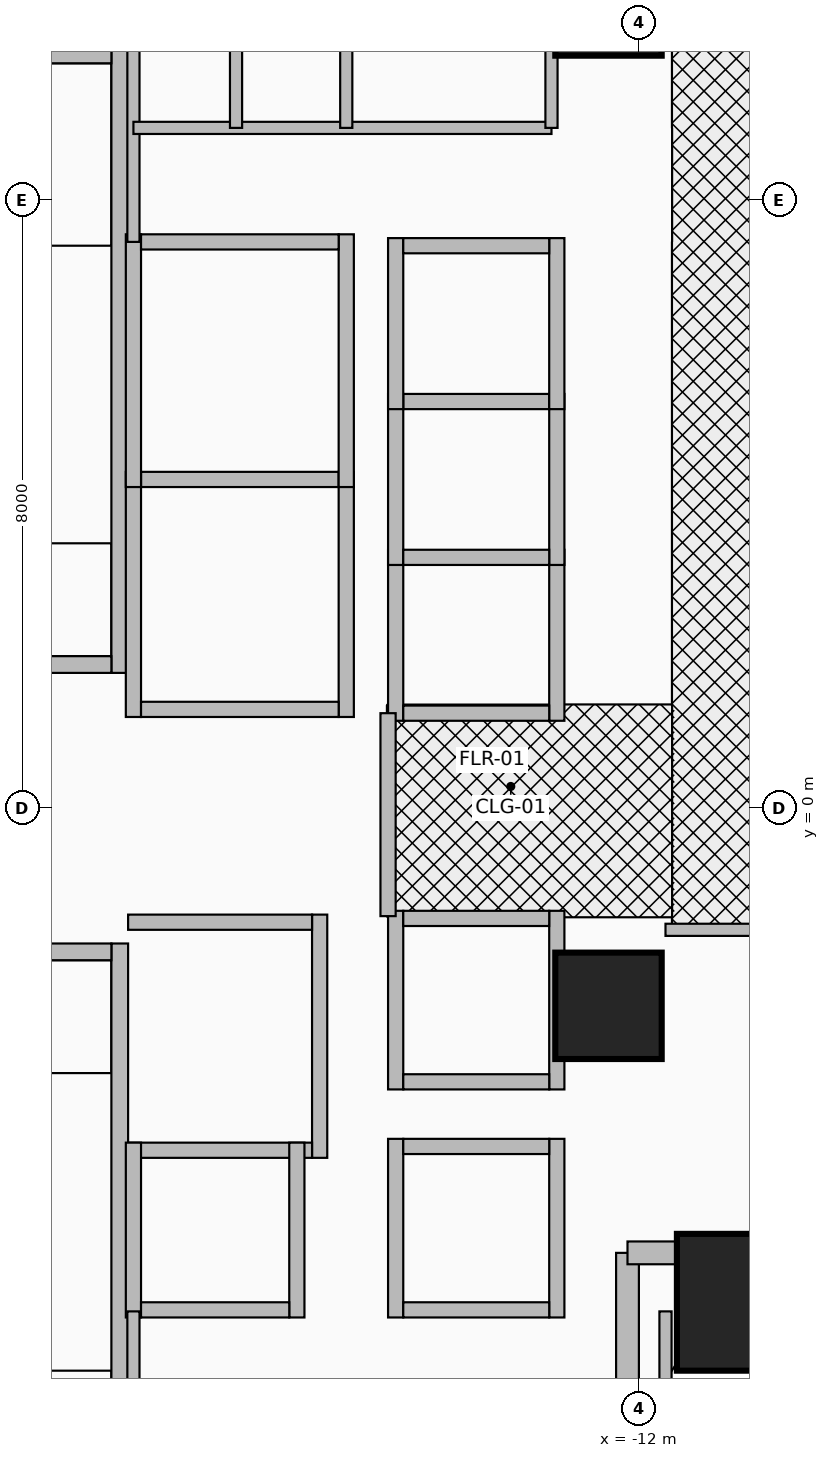
"""IFC4 building model, lengths in metres.
Left out: names, types, materials, properties, quantities, classifications, styles, units other than length and angle.
Written with IfcOpenShell. Run it as: python <this file> out.ifc"""

import sys

from ifc_helpers import new_model, si_unit, direction, frame, frame_2d, origin, origin_2d, place, context, subcontext, project, spatial, rectangle, extrude, source, transform, mapped, element, fill, save


model = new_model("IFC4")
c1 = context("Model", 3, precision=1e-05, world=origin(), true_north=direction((0.0, 1.0)))
c2 = subcontext(c1, "Body", "Model", "MODEL_VIEW")
j1 = project(units=[si_unit("LENGTHUNIT", "METRE"), si_unit("PLANEANGLEUNIT", "RADIAN")], contexts=[c1])
p1 = place(None, origin())
s1 = spatial("IfcSite", under=j1, at=p1, CompositionType="ELEMENT")
p2 = place(p1, origin())
s2 = spatial("IfcBuilding", under=s1, at=p2, CompositionType="ELEMENT")
p3 = place(p2, frame((0.0, 0.0, 10.4)))
s3 = spatial("IfcBuildingStorey", under=s2, at=p3, CompositionType="ELEMENT", Elevation=10.4)
p4 = place(p3, frame((-18.83, 1.78, 0.0), z_axis=(0.0, 0.0, 1.0), x_axis=(0.0, 1.0, 0.0)))
e1 = element("IfcWall", 1, at=p4, inside=s3, PredefinedType="SHEAR", context=c2, shape_type="SweptSolid", body=[
    extrude(rectangle(XDim=8.67, YDim=0.22, at=frame_2d((4.335, 0.0))), origin(), (0.0, 0.0, 1.0), 4.92),
])
p5 = place(p3, frame((-22.05, 1.89, 0.0), z_axis=(0.0, 0.0, 1.0), x_axis=(1.0, 0.0, 0.0)))
e2 = element("IfcWall", 2, at=p5, inside=s3, PredefinedType="SHEAR", context=c2, shape_type="SweptSolid", body=[
    extrude(rectangle(XDim=3.11, YDim=0.22, at=frame_2d((1.555, 0.0))), origin(), (0.0, 0.0, 1.0), 4.92),
])
p6 = place(p5, frame((1.0, 0.0, 0.0)))
e3 = element("IfcOpeningElement", 3, at=p6, cuts=e2, PredefinedType="OPENING", context=c2, shape_type="SweptSolid", body=[
    extrude(rectangle(XDim=1.1, YDim=2.15, at=frame_2d((0.55, 1.075))), frame((0.0, 0.125, 0.0), z_axis=(0.0, -1.0, 0.0), x_axis=(1.0, 0.0, 0.0)), (0.0, 0.0, 1.0), 0.25),
])
p7 = place(p3, frame((-22.05, 9.91, 0.0), z_axis=(0.0, 0.0, 1.0), x_axis=(1.0, 0.0, 0.0)))
e4 = element("IfcWall", 4, at=p7, inside=s3, PredefinedType="SHEAR", context=c2, shape_type="SweptSolid", body=[
    extrude(rectangle(XDim=3.11, YDim=0.22, at=frame_2d((1.555, 0.0))), origin(), (0.0, 0.0, 1.0), 4.92),
])
p8 = place(p3, frame((-18.83, -10.45, 0.0), z_axis=(0.0, 0.0, 1.0), x_axis=(0.0, 1.0, 0.0)))
e5 = element("IfcWall", 5, at=p8, inside=s3, PredefinedType="SHEAR", context=c2, shape_type="SweptSolid", body=[
    extrude(rectangle(XDim=8.67, YDim=0.22, at=frame_2d((4.335, 0.0))), origin(), (0.0, 0.0, 1.0), 4.92),
])
p9 = place(p3, frame((-22.05, -1.89, 0.0), z_axis=(0.0, 0.0, 1.0), x_axis=(1.0, 0.0, 0.0)))
e6 = element("IfcWall", 6, at=p9, inside=s3, PredefinedType="SHEAR", context=c2, shape_type="SweptSolid", body=[
    extrude(rectangle(XDim=3.11, YDim=0.22, at=frame_2d((1.555, 0.0))), origin(), (0.0, 0.0, 1.0), 4.92),
])
p10 = place(p9, frame((1.0, 0.0, 0.0)))
e7 = element("IfcOpeningElement", 7, at=p10, cuts=e6, PredefinedType="OPENING", context=c2, shape_type="SweptSolid", body=[
    extrude(rectangle(XDim=1.1, YDim=2.15, at=frame_2d((0.55, 1.075))), frame((0.0, 0.125, 0.0), z_axis=(0.0, -1.0, 0.0), x_axis=(1.0, 0.0, 0.0)), (0.0, 0.0, 1.0), 0.25),
])
m1 = source(origin(), c2, "Body", "SweptSolid", [
    extrude(rectangle(XDim=1.4, YDim=1.4, at=origin_2d()), origin(), (0.0, 0.0, 1.0), 5.2),
])
for number, where, z_axis, x_axis in (
    (8, (-12.4, -2.6, 0.0), (0.0, 0.0, 1.0), (1.0, 0.0, 0.0)),
    (9, (-12.4, 10.6, 0.0), (0.0, 0.0, 1.0), (1.0, 0.0, 0.0)),
):
    element("IfcColumn", number, at=place(p3, frame(where, z_axis=z_axis, x_axis=x_axis)), inside=s3, PredefinedType="COLUMN", context=c2, shape_type="MappedRepresentation", body=[
        mapped(m1, transform((0.0, 0.0, 0.0), x_axis=(1.0, 0.0, 0.0), y_axis=(0.0, 1.0, 0.0), z_axis=(0.0, 0.0, 1.0), scale=1.0)),
    ])
m2 = source(origin(), c2, "Body", "SweptSolid", [
    extrude(rectangle(XDim=1.8, YDim=1.8, at=origin_2d()), origin(), (0.0, 0.0, 1.0), 5.2),
])
p11 = place(p3, frame((-10.6, -6.5, 0.0), z_axis=(0.0, 0.0, 1.0), x_axis=(1.0, 0.0, 0.0)))
e10 = element("IfcColumn", 10, at=p11, inside=s3, PredefinedType="COLUMN", context=c2, shape_type="MappedRepresentation", body=[
    mapped(m2, transform((0.0, 0.0, 0.0), x_axis=(1.0, 0.0, 0.0), y_axis=(0.0, 1.0, 0.0), z_axis=(0.0, 0.0, 1.0), scale=1.0)),
])
p12 = place(p3, frame((-12.15, -22.85, 0.0), z_axis=(0.0, 0.0, 1.0), x_axis=(0.0, 1.0, 0.0)))
e11 = element("IfcWall", 11, at=p12, inside=s3, PredefinedType="SOLIDWALL", context=c2, shape_type="SweptSolid", body=[
    extrude(rectangle(XDim=17.0, YDim=0.3, at=frame_2d((8.5, 0.0))), origin(), (0.0, 0.0, 1.0), 3.957),
])
p13 = place(p3, frame((-12.15, -5.85, 0.0), z_axis=(0.0, 0.0, 1.0), x_axis=(1.0, 0.0, 0.0)))
e12 = element("IfcWall", 12, at=p13, inside=s3, PredefinedType="SOLIDWALL", context=c2, shape_type="SweptSolid", body=[
    extrude(rectangle(XDim=2.63, YDim=0.3, at=frame_2d((1.315, 0.0))), origin(), (0.0, 0.0, 1.0), 4.92),
])
for number, where, z_axis, x_axis in (
    (13, (-18.65, 1.2, 0.0), (0.0, 0.0, 1.0), (0.0, 1.0, 0.0)),
    (14, (-15.85, 1.2, 0.0), (0.0, 0.0, 1.0), (0.0, 1.0, 0.0)),
):
    element("IfcWall", number, at=place(p3, frame(where, z_axis=z_axis, x_axis=x_axis)), inside=s3, PredefinedType="MOVABLE", context=c2, shape_type="SweptSolid", body=[
        extrude(rectangle(XDim=3.225, YDim=0.2, at=frame_2d((1.613, 0.0))), origin(), (0.0, 0.0, 1.0), 4.92),
    ])
p14 = place(p3, frame((-18.55, 1.3, 0.0), z_axis=(0.0, 0.0, 1.0), x_axis=(1.0, 0.0, 0.0)))
e15 = element("IfcWall", 15, at=p14, inside=s3, PredefinedType="MOVABLE", context=c2, shape_type="SweptSolid", body=[
    extrude(rectangle(XDim=2.6, YDim=0.2, at=frame_2d((1.3, 0.0))), origin(), (0.0, 0.0, 1.0), 4.92),
])
p15 = place(p14, frame((0.7, 0.0, 0.0)))
e16 = element("IfcOpeningElement", 16, at=p15, cuts=e15, PredefinedType="OPENING", context=c2, shape_type="SweptSolid", body=[
    extrude(rectangle(XDim=1.2, YDim=2.1, at=frame_2d((0.6, 1.05))), frame((0.0, 0.115, 0.0), z_axis=(0.0, -1.0, 0.0), x_axis=(1.0, 0.0, 0.0)), (0.0, 0.0, 1.0), 0.23),
])
p16 = place(p3, frame((-18.55, 4.325, 0.0), z_axis=(0.0, 0.0, 1.0), x_axis=(1.0, 0.0, 0.0)))
e17 = element("IfcWall", 17, at=p16, inside=s3, PredefinedType="MOVABLE", context=c2, shape_type="SweptSolid", body=[
    extrude(rectangle(XDim=2.6, YDim=0.2, at=frame_2d((1.3, 0.0))), origin(), (0.0, 0.0, 1.0), 4.92),
])
p17 = place(p3, frame((-16.2, -4.6, 0.0), z_axis=(0.0, 0.0, 1.0), x_axis=(0.0, 1.0, 0.0)))
e18 = element("IfcWall", 18, at=p17, inside=s3, PredefinedType="MOVABLE", context=c2, shape_type="SweptSolid", body=[
    extrude(rectangle(XDim=3.2, YDim=0.2, at=frame_2d((1.6, 0.0))), origin(), (0.0, 0.0, 1.0), 4.92),
])
p18 = place(p3, frame((-18.72, -4.5, 0.0), z_axis=(0.0, 0.0, 1.0), x_axis=(1.0, 0.0, 0.0)))
e19 = element("IfcWall", 19, at=p18, inside=s3, PredefinedType="MOVABLE", context=c2, shape_type="SweptSolid", body=[
    extrude(rectangle(XDim=2.42, YDim=0.2, at=frame_2d((1.21, 0.0))), origin(), (0.0, 0.0, 1.0), 4.92),
])
p19 = place(p3, frame((-18.72, -1.5, 0.0), z_axis=(0.0, 0.0, 1.0), x_axis=(1.0, 0.0, 0.0)))
e20 = element("IfcWall", 20, at=p19, inside=s3, PredefinedType="MOVABLE", context=c2, shape_type="SweptSolid", body=[
    extrude(rectangle(XDim=2.42, YDim=0.2, at=frame_2d((1.21, 0.0))), origin(), (0.0, 0.0, 1.0), 4.92),
])
p20 = place(p19, frame((0.61, 0.0, 0.0)))
e21 = element("IfcOpeningElement", 21, at=p20, cuts=e20, PredefinedType="OPENING", context=c2, shape_type="SweptSolid", body=[
    extrude(rectangle(XDim=1.2, YDim=2.1, at=frame_2d((0.6, 1.05))), frame((0.0, 0.115, 0.0), z_axis=(0.0, -1.0, 0.0), x_axis=(1.0, 0.0, 0.0)), (0.0, 0.0, 1.0), 0.23),
])
for number, where, z_axis, x_axis in (
    (22, (-18.65, 4.225, 0.0), (0.0, 0.0, 1.0), (0.0, 1.0, 0.0)),
    (23, (-15.85, 4.225, 0.0), (0.0, 0.0, 1.0), (0.0, 1.0, 0.0)),
):
    element("IfcWall", number, at=place(p3, frame(where, z_axis=z_axis, x_axis=x_axis)), inside=s3, PredefinedType="MOVABLE", context=c2, shape_type="SweptSolid", body=[
        extrude(rectangle(XDim=3.325, YDim=0.2, at=frame_2d((1.663, 0.0))), origin(), (0.0, 0.0, 1.0), 4.92),
    ])
p21 = place(p3, frame((-18.55, 7.45, 0.0), z_axis=(0.0, 0.0, 1.0), x_axis=(1.0, 0.0, 0.0)))
e24 = element("IfcWall", 24, at=p21, inside=s3, PredefinedType="MOVABLE", context=c2, shape_type="SweptSolid", body=[
    extrude(rectangle(XDim=2.6, YDim=0.2, at=frame_2d((1.3, 0.0))), origin(), (0.0, 0.0, 1.0), 4.92),
])
p22 = place(p21, frame((0.7, 0.0, 0.0)))
e25 = element("IfcOpeningElement", 25, at=p22, cuts=e24, PredefinedType="OPENING", context=c2, shape_type="SweptSolid", body=[
    extrude(rectangle(XDim=1.2, YDim=2.1, at=frame_2d((0.6, 1.05))), frame((0.0, 0.115, 0.0), z_axis=(0.0, -1.0, 0.0), x_axis=(1.0, 0.0, 0.0)), (0.0, 0.0, 1.0), 0.23),
])
for number, where, z_axis, x_axis in (
    (26, (-15.2, -6.7, 0.0), (0.0, 0.0, 1.0), (0.0, 1.0, 0.0)),
    (27, (-13.08, -6.7, 0.0), (0.0, 0.0, 1.0), (0.0, 1.0, 0.0)),
):
    element("IfcWall", number, at=place(p3, frame(where, z_axis=z_axis, x_axis=x_axis)), inside=s3, PredefinedType="MOVABLE", context=c2, shape_type="SweptSolid", body=[
        extrude(rectangle(XDim=2.35, YDim=0.2, at=frame_2d((1.175, 0.0))), origin(), (0.0, 0.0, 1.0), 4.92),
    ])
p23 = place(p3, frame((-15.1, -6.6, 0.0), z_axis=(0.0, 0.0, 1.0), x_axis=(1.0, 0.0, 0.0)))
e28 = element("IfcWall", 28, at=p23, inside=s3, PredefinedType="MOVABLE", context=c2, shape_type="SweptSolid", body=[
    extrude(rectangle(XDim=1.92, YDim=0.2, at=frame_2d((0.96, 0.0))), origin(), (0.0, 0.0, 1.0), 4.92),
])
p24 = place(p23, frame((0.41, 0.0, 0.0)))
e29 = element("IfcOpeningElement", 29, at=p24, cuts=e28, PredefinedType="OPENING", context=c2, shape_type="SweptSolid", body=[
    extrude(rectangle(XDim=1.1, YDim=2.1, at=frame_2d((0.55, 1.05))), frame((0.0, 0.115, 0.0), z_axis=(0.0, -1.0, 0.0), x_axis=(1.0, 0.0, 0.0)), (0.0, 0.0, 1.0), 0.23),
])
p25 = place(p3, frame((-15.1, -4.45, 0.0), z_axis=(0.0, 0.0, 1.0), x_axis=(1.0, 0.0, 0.0)))
e30 = element("IfcWall", 30, at=p25, inside=s3, PredefinedType="MOVABLE", context=c2, shape_type="SweptSolid", body=[
    extrude(rectangle(XDim=1.92, YDim=0.2, at=frame_2d((0.96, 0.0))), origin(), (0.0, 0.0, 1.0), 4.92),
])
for number, where, z_axis, x_axis in (
    (31, (-15.2, 1.15, 0.0), (0.0, 0.0, 1.0), (0.0, 1.0, 0.0)),
    (32, (-13.08, 1.15, 0.0), (0.0, 0.0, 1.0), (0.0, 1.0, 0.0)),
):
    element("IfcWall", number, at=place(p3, frame(where, z_axis=z_axis, x_axis=x_axis)), inside=s3, PredefinedType="MOVABLE", context=c2, shape_type="SweptSolid", body=[
        extrude(rectangle(XDim=2.25, YDim=0.2, at=frame_2d((1.125, 0.0))), origin(), (0.0, 0.0, 1.0), 4.92),
    ])
p26 = place(p3, frame((-15.1, 1.25, 0.0), z_axis=(0.0, 0.0, 1.0), x_axis=(1.0, 0.0, 0.0)))
e33 = element("IfcWall", 33, at=p26, inside=s3, PredefinedType="MOVABLE", context=c2, shape_type="SweptSolid", body=[
    extrude(rectangle(XDim=1.92, YDim=0.2, at=frame_2d((0.96, 0.0))), origin(), (0.0, 0.0, 1.0), 4.92),
])
for number, where, z_axis, x_axis in (
    (34, (-15.2, 3.2, 0.0), (0.0, 0.0, 1.0), (0.0, 1.0, 0.0)),
    (35, (-13.08, 3.2, 0.0), (0.0, 0.0, 1.0), (0.0, 1.0, 0.0)),
):
    element("IfcWall", number, at=place(p3, frame(where, z_axis=z_axis, x_axis=x_axis)), inside=s3, PredefinedType="MOVABLE", context=c2, shape_type="SweptSolid", body=[
        extrude(rectangle(XDim=2.25, YDim=0.2, at=frame_2d((1.125, 0.0))), origin(), (0.0, 0.0, 1.0), 4.92),
    ])
for number, where, z_axis, x_axis in (
    (36, (-15.1, 3.3, 0.0), (0.0, 0.0, 1.0), (1.0, 0.0, 0.0)),
    (37, (-15.1, 5.35, 0.0), (0.0, 0.0, 1.0), (1.0, 0.0, 0.0)),
):
    element("IfcWall", number, at=place(p3, frame(where, z_axis=z_axis, x_axis=x_axis)), inside=s3, PredefinedType="MOVABLE", context=c2, shape_type="SweptSolid", body=[
        extrude(rectangle(XDim=1.92, YDim=0.2, at=frame_2d((0.96, 0.0))), origin(), (0.0, 0.0, 1.0), 4.92),
    ])
for number, where, z_axis, x_axis in (
    (38, (-15.2, 5.25, 0.0), (0.0, 0.0, 1.0), (0.0, 1.0, 0.0)),
    (39, (-13.08, 5.25, 0.0), (0.0, 0.0, 1.0), (0.0, 1.0, 0.0)),
):
    element("IfcWall", number, at=place(p3, frame(where, z_axis=z_axis, x_axis=x_axis)), inside=s3, PredefinedType="MOVABLE", context=c2, shape_type="SweptSolid", body=[
        extrude(rectangle(XDim=2.25, YDim=0.2, at=frame_2d((1.125, 0.0))), origin(), (0.0, 0.0, 1.0), 4.92),
    ])
p27 = place(p3, frame((-15.1, 7.4, 0.0), z_axis=(0.0, 0.0, 1.0), x_axis=(1.0, 0.0, 0.0)))
e40 = element("IfcWall", 40, at=p27, inside=s3, PredefinedType="MOVABLE", context=c2, shape_type="SweptSolid", body=[
    extrude(rectangle(XDim=1.92, YDim=0.2, at=frame_2d((0.96, 0.0))), origin(), (0.0, 0.0, 1.0), 4.92),
])
for number, where, z_axis, x_axis in (
    (41, (-18.65, -6.7, 0.0), (0.0, 0.0, 1.0), (0.0, 1.0, 0.0)),
    (42, (-16.5, -6.7, 0.0), (0.0, 0.0, 1.0), (0.0, 1.0, 0.0)),
):
    element("IfcWall", number, at=place(p3, frame(where, z_axis=z_axis, x_axis=x_axis)), inside=s3, PredefinedType="MOVABLE", context=c2, shape_type="SweptSolid", body=[
        extrude(rectangle(XDim=2.3, YDim=0.2, at=frame_2d((1.15, 0.0))), origin(), (0.0, 0.0, 1.0), 4.92),
    ])
p28 = place(p3, frame((-18.55, -6.6, 0.0), z_axis=(0.0, 0.0, 1.0), x_axis=(1.0, 0.0, 0.0)))
e43 = element("IfcWall", 43, at=p28, inside=s3, PredefinedType="MOVABLE", context=c2, shape_type="SweptSolid", body=[
    extrude(rectangle(XDim=1.95, YDim=0.2, at=frame_2d((0.975, 0.0))), origin(), (0.0, 0.0, 1.0), 4.92),
])
for number, where, z_axis, x_axis in (
    (44, (-15.2, -3.7, 0.0), (0.0, 0.0, 1.0), (0.0, 1.0, 0.0)),
    (45, (-13.08, -3.7, 0.0), (0.0, 0.0, 1.0), (0.0, 1.0, 0.0)),
):
    element("IfcWall", number, at=place(p3, frame(where, z_axis=z_axis, x_axis=x_axis)), inside=s3, PredefinedType="MOVABLE", context=c2, shape_type="SweptSolid", body=[
        extrude(rectangle(XDim=2.35, YDim=0.2, at=frame_2d((1.175, 0.0))), origin(), (0.0, 0.0, 1.0), 4.92),
    ])
for number, where, z_axis, x_axis in (
    (46, (-15.1, -3.6, 0.0), (0.0, 0.0, 1.0), (1.0, 0.0, 0.0)),
    (47, (-15.1, -1.45, 0.0), (0.0, 0.0, 1.0), (1.0, 0.0, 0.0)),
):
    element("IfcWall", number, at=place(p3, frame(where, z_axis=z_axis, x_axis=x_axis)), inside=s3, PredefinedType="MOVABLE", context=c2, shape_type="SweptSolid", body=[
        extrude(rectangle(XDim=1.92, YDim=0.2, at=frame_2d((0.96, 0.0))), origin(), (0.0, 0.0, 1.0), 4.92),
    ])
p29 = place(p3, frame((-15.3, -1.42, 0.0), z_axis=(0.0, 0.0, 1.0), x_axis=(0.0, 1.0, 0.0)))
e48 = element("IfcWall", 48, at=p29, inside=s3, PredefinedType="PARTITIONING", context=c2, shape_type="SweptSolid", body=[
    extrude(rectangle(XDim=2.67, YDim=0.2, at=frame_2d((1.335, 0.0))), origin(), (0.0, 0.0, 1.0), 4.92),
])
p30 = place(p29, frame((0.78, 0.0, 0.0)))
e49 = element("IfcOpeningElement", 49, at=p30, cuts=e48, PredefinedType="OPENING", context=c2, shape_type="SweptSolid", body=[
    extrude(rectangle(XDim=1.05, YDim=2.15, at=frame_2d((0.525, 1.075))), frame((0.0, 0.115, 0.0), z_axis=(0.0, -1.0, 0.0), x_axis=(1.0, 0.0, 0.0)), (0.0, 0.0, 1.0), 0.23),
])
p31 = place(p3, frame((-18.65, 7.45, 0.0), z_axis=(0.0, 0.0, 1.0), x_axis=(0.0, 1.0, 0.0)))
e50 = element("IfcWall", 50, at=p31, inside=s3, PredefinedType="PARTITIONING", context=c2, shape_type="SweptSolid", body=[
    extrude(rectangle(XDim=2.93, YDim=0.16, at=frame_2d((1.465, 0.0))), origin(), (0.0, 0.0, 1.0), 3.957),
])
p32 = place(p3, frame((-18.65, -8.18, 0.0), z_axis=(0.0, 0.0, 1.0), x_axis=(0.0, 1.0, 0.0)))
e51 = element("IfcWall", 51, at=p32, inside=s3, PredefinedType="PARTITIONING", context=c2, shape_type="SweptSolid", body=[
    extrude(rectangle(XDim=1.56, YDim=0.16, at=frame_2d((0.78, 0.0))), origin(), (0.0, 0.0, 1.0), 4.92),
])
p33 = place(p3, frame((-11.65, -8.18, 0.0), z_axis=(0.0, 0.0, 1.0), x_axis=(0.0, 1.0, 0.0)))
e52 = element("IfcWall", 52, at=p33, inside=s3, PredefinedType="PARTITIONING", context=c2, shape_type="SweptSolid", body=[
    extrude(rectangle(XDim=1.56, YDim=0.16, at=frame_2d((0.78, 0.0))), origin(), (0.0, 0.0, 1.0), 3.957),
])
p34 = place(p3, frame((-18.65, 8.95, 0.0), z_axis=(0.0, 0.0, 1.0), x_axis=(1.0, 0.0, 0.0)))
e53 = element("IfcWall", 53, at=p34, inside=s3, PredefinedType="PARTITIONING", context=c2, shape_type="SweptSolid", body=[
    extrude(rectangle(XDim=5.5, YDim=0.16, at=frame_2d((2.75, 0.0))), origin(), (0.0, 0.0, 1.0), 4.92),
])
p35 = place(p34, frame((0.3, 0.0, 0.0)))
e54 = element("IfcOpeningElement", 54, at=p35, cuts=e53, PredefinedType="OPENING", context=c2, shape_type="SweptSolid", body=[
    extrude(rectangle(XDim=0.85, YDim=2.05, at=frame_2d((0.425, 1.025))), frame((0.0, 0.095, 0.0), z_axis=(0.0, -1.0, 0.0), x_axis=(1.0, 0.0, 0.0)), (0.0, 0.0, 1.0), 0.19),
])
p36 = place(p34, frame((3.2, 0.0, 0.0)))
e55 = element("IfcOpeningElement", 55, at=p36, cuts=e53, PredefinedType="OPENING", context=c2, shape_type="SweptSolid", body=[
    extrude(rectangle(XDim=0.85, YDim=2.05, at=frame_2d((0.425, 1.025))), frame((0.0, 0.095, 0.0), z_axis=(0.0, -1.0, 0.0), x_axis=(1.0, 0.0, 0.0)), (0.0, 0.0, 1.0), 0.19),
])
for number, where, z_axis, x_axis in (
    (56, (-13.15, 8.95, 0.0), (0.0, 0.0, 1.0), (0.0, 1.0, 0.0)),
    (57, (-17.3, 8.95, 0.0), (0.0, 0.0, 1.0), (0.0, 1.0, 0.0)),
):
    element("IfcWall", number, at=place(p3, frame(where, z_axis=z_axis, x_axis=x_axis)), inside=s3, PredefinedType="PARTITIONING", context=c2, shape_type="SweptSolid", body=[
        extrude(rectangle(XDim=1.43, YDim=0.16, at=frame_2d((0.715, 0.0))), origin(), (0.0, 0.0, 1.0), 3.957),
    ])
p37 = place(p3, frame((-15.85, 8.95, 0.0), z_axis=(0.0, 0.0, 1.0), x_axis=(0.0, 1.0, 0.0)))
e58 = element("IfcWall", 58, at=p37, inside=s3, PredefinedType="PARTITIONING", context=c2, shape_type="SweptSolid", body=[
    extrude(rectangle(XDim=1.43, YDim=0.16, at=frame_2d((0.715, 0.0))), origin(), (0.0, 0.0, 1.0), 3.957),
])
p38 = place(p37, frame((0.29, 0.0, 0.0)))
e59 = element("IfcOpeningElement", 59, at=p38, cuts=e58, PredefinedType="OPENING", context=c2, shape_type="SweptSolid", body=[
    extrude(rectangle(XDim=0.85, YDim=2.05, at=frame_2d((0.425, 1.025))), frame((0.0, 0.095, 0.0), z_axis=(0.0, -1.0, 0.0), x_axis=(1.0, 0.0, 0.0)), (0.0, 0.0, 1.0), 0.19),
])
p39 = place(p3, frame((-11.65, -1.6, 0.0), z_axis=(0.0, 0.0, 1.0), x_axis=(1.0, 0.0, 0.0)))
e60 = element("IfcWall", 60, at=p39, inside=s3, PredefinedType="PARTITIONING", context=c2, shape_type="SweptSolid", body=[
    extrude(rectangle(XDim=1.85, YDim=0.16, at=frame_2d((0.925, 0.0))), origin(), (0.0, 0.0, 1.0), 4.92),
])
p40 = place(p15, origin())
e61 = element("IfcDoor", 61, at=p40, inside=s3, OperationType="DOUBLE_DOOR_SLIDING", PredefinedType="DOOR", context=c2, shape_type="SweptSolid", body=[
    extrude(rectangle(XDim=1.2, YDim=2.1, at=frame_2d((0.6, 1.05))), frame((0.0, 0.025, 0.0), z_axis=(0.0, -1.0, 0.0), x_axis=(1.0, 0.0, 0.0)), (0.0, 0.0, 1.0), 0.05),
])
fill(e16, e61)
p41 = place(p20, origin())
e62 = element("IfcDoor", 62, at=p41, inside=s3, OperationType="DOUBLE_DOOR_SLIDING", PredefinedType="DOOR", context=c2, shape_type="SweptSolid", body=[
    extrude(rectangle(XDim=1.2, YDim=2.1, at=frame_2d((0.6, 1.05))), frame((0.0, 0.025, 0.0), z_axis=(0.0, -1.0, 0.0), x_axis=(1.0, 0.0, 0.0)), (0.0, 0.0, 1.0), 0.05),
])
fill(e21, e62)
p42 = place(p22, origin())
e63 = element("IfcDoor", 63, at=p42, inside=s3, OperationType="DOUBLE_DOOR_SLIDING", PredefinedType="DOOR", context=c2, shape_type="SweptSolid", body=[
    extrude(rectangle(XDim=1.2, YDim=2.1, at=frame_2d((0.6, 1.05))), frame((0.0, 0.025, 0.0), z_axis=(0.0, -1.0, 0.0), x_axis=(1.0, 0.0, 0.0)), (0.0, 0.0, 1.0), 0.05),
])
fill(e25, e63)
p43 = place(p24, origin())
e64 = element("IfcDoor", 64, at=p43, inside=s3, OperationType="DOUBLE_DOOR_SLIDING", PredefinedType="DOOR", context=c2, shape_type="SweptSolid", body=[
    extrude(rectangle(XDim=1.1, YDim=2.1, at=frame_2d((0.55, 1.05))), frame((0.0, 0.025, 0.0), z_axis=(0.0, -1.0, 0.0), x_axis=(1.0, 0.0, 0.0)), (0.0, 0.0, 1.0), 0.05),
])
fill(e29, e64)
p44 = place(p30, origin())
e65 = element("IfcDoor", 65, at=p44, inside=s3, OperationType="SINGLE_SWING_RIGHT", PredefinedType="DOOR", context=c2, shape_type="SweptSolid", body=[
    extrude(rectangle(XDim=1.05, YDim=2.15, at=frame_2d((0.525, 1.075))), frame((0.0, 0.025, 0.0), z_axis=(0.0, -1.0, 0.0), x_axis=(1.0, 0.0, 0.0)), (0.0, 0.0, 1.0), 0.05),
])
fill(e49, e65)
p45 = place(p35, origin())
e66 = element("IfcDoor", 66, at=p45, inside=s3, OperationType="SINGLE_SWING_LEFT", PredefinedType="DOOR", context=c2, shape_type="SweptSolid", body=[
    extrude(rectangle(XDim=0.85, YDim=2.05, at=frame_2d((0.425, 1.025))), frame((0.0, 0.025, 0.0), z_axis=(0.0, -1.0, 0.0), x_axis=(1.0, 0.0, 0.0)), (0.0, 0.0, 1.0), 0.05),
])
fill(e54, e66)
p46 = place(p36, origin())
e67 = element("IfcDoor", 67, at=p46, inside=s3, OperationType="SINGLE_SWING_RIGHT", PredefinedType="DOOR", context=c2, shape_type="SweptSolid", body=[
    extrude(rectangle(XDim=0.85, YDim=2.05, at=frame_2d((0.425, 1.025))), frame((0.0, 0.025, 0.0), z_axis=(0.0, -1.0, 0.0), x_axis=(1.0, 0.0, 0.0)), (0.0, 0.0, 1.0), 0.05),
])
fill(e55, e67)
p47 = place(p38, origin())
e68 = element("IfcDoor", 68, at=p47, inside=s3, OperationType="SINGLE_SWING_LEFT", PredefinedType="DOOR", context=c2, shape_type="SweptSolid", body=[
    extrude(rectangle(XDim=0.85, YDim=2.05, at=frame_2d((0.425, 1.025))), frame((0.0, 0.025, 0.0), z_axis=(0.0, -1.0, 0.0), x_axis=(1.0, 0.0, 0.0)), (0.0, 0.0, 1.0), 0.05),
])
fill(e59, e68)
save(model, sys.argv[1])
